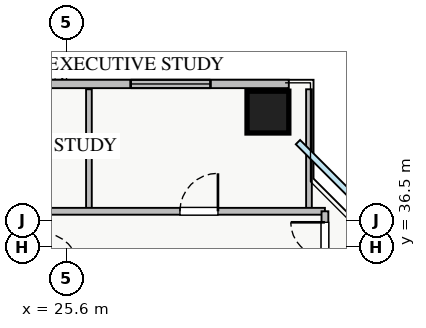
"""IFC4 building model, lengths in metres.
Left out: names, types, materials, properties, quantities, classifications, styles, units other than length and angle.
Written with IfcOpenShell. Run it as: python <this file> out.ifc"""

import sys

from ifc_helpers import new_model, si_unit, direction, frame, frame_2d, origin, origin_2d, place, context, subcontext, project, spatial, rectangle, extrude, source, transform, mapped, element, fill, save


model = new_model("IFC4")
c1 = context("Model", 3, precision=1e-05, world=origin(), true_north=direction((0.0, 1.0)))
c2 = subcontext(c1, "Body", "Model", "MODEL_VIEW")
j1 = project(units=[si_unit("LENGTHUNIT", "METRE"), si_unit("PLANEANGLEUNIT", "RADIAN")], contexts=[c1])
p1 = place(None, origin())
s1 = spatial("IfcSite", under=j1, at=p1, CompositionType="ELEMENT")
p2 = place(p1, origin())
s2 = spatial("IfcBuilding", under=s1, at=p2, CompositionType="ELEMENT")
p3 = place(p2, frame((0.0, 0.0, 100.25)))
s3 = spatial("IfcBuildingStorey", under=s2, at=p3, CompositionType="ELEMENT", Elevation=100.25)
m1 = source(origin(), c2, "Body", "SweptSolid", [
    extrude(rectangle(XDim=1.1, YDim=1.1, at=origin_2d()), origin(), (0.0, 0.0, 1.0), 3.25),
])
p4 = place(p3, frame((30.9, 40.05, 0.0), z_axis=(0.0, 0.0, 1.0), x_axis=(1.0, 0.0, 0.0)))
e1 = element("IfcColumn", 1, at=p4, inside=s3, PredefinedType="COLUMN", context=c2, shape_type="MappedRepresentation", body=[
    mapped(m1, transform((0.0, 0.0, 0.0), x_axis=(1.0, 0.0, 0.0), y_axis=(0.0, 1.0, 0.0), z_axis=(0.0, 0.0, 1.0), scale=1.0)),
])
p5 = place(p3, frame((6.55, 40.79, 0.0), z_axis=(0.0, 0.0, 1.0), x_axis=(1.0, 0.0, 0.0)))
e2 = element("IfcWall", 2, at=p5, inside=s3, PredefinedType="STANDARD", context=c2, shape_type="SweptSolid", body=[
    extrude(rectangle(XDim=24.9, YDim=0.22, at=frame_2d((12.45, 0.0))), origin(), (0.0, 0.0, 1.0), 2.61),
])
p6 = place(p5, frame((13.3, 0.0, 0.0)))
e3 = element("IfcOpeningElement", 3, at=p6, cuts=e2, PredefinedType="OPENING", context=c2, shape_type="SweptSolid", body=[
    extrude(rectangle(XDim=1.2, YDim=2.1, at=frame_2d((0.6, 1.05))), frame((0.0, 0.12, 0.0), z_axis=(0.0, -1.0, 0.0), x_axis=(1.0, 0.0, 0.0)), (0.0, 0.0, 1.0), 0.24),
])
p7 = place(p5, frame((0.393, 0.0, 0.9)))
e4 = element("IfcOpeningElement", 4, at=p7, cuts=e2, PredefinedType="OPENING", context=c2, shape_type="SweptSolid", body=[
    extrude(rectangle(XDim=1.5, YDim=1.5, at=frame_2d((0.75, 0.75))), frame((0.0, 0.12, 0.0), z_axis=(0.0, -1.0, 0.0), x_axis=(1.0, 0.0, 0.0)), (0.0, 0.0, 1.0), 0.24),
])
p8 = place(p5, frame((9.76, 0.0, 0.9)))
e5 = element("IfcOpeningElement", 5, at=p8, cuts=e2, PredefinedType="OPENING", context=c2, shape_type="SweptSolid", body=[
    extrude(rectangle(XDim=1.8, YDim=1.5, at=frame_2d((0.9, 0.75))), frame((0.0, 0.12, 0.0), z_axis=(0.0, -1.0, 0.0), x_axis=(1.0, 0.0, 0.0)), (0.0, 0.0, 1.0), 0.24),
])
p9 = place(p5, frame((14.813, 0.0, 0.9)))
e6 = element("IfcOpeningElement", 6, at=p9, cuts=e2, PredefinedType="OPENING", context=c2, shape_type="SweptSolid", body=[
    extrude(rectangle(XDim=1.5, YDim=1.45, at=frame_2d((0.75, 0.725))), frame((0.0, 0.12, 0.0), z_axis=(0.0, -1.0, 0.0), x_axis=(1.0, 0.0, 0.0)), (0.0, 0.0, 1.0), 0.24),
])
p10 = place(p5, frame((20.738, 0.0, 0.9)))
e7 = element("IfcOpeningElement", 7, at=p10, cuts=e2, PredefinedType="OPENING", context=c2, shape_type="SweptSolid", body=[
    extrude(rectangle(XDim=2.1, YDim=1.48, at=frame_2d((1.05, 0.74))), frame((0.0, 0.12, 0.0), z_axis=(0.0, -1.0, 0.0), x_axis=(1.0, 0.0, 0.0)), (0.0, 0.0, 1.0), 0.24),
])
p11 = place(p5, frame((4.171, 0.0, 0.9)))
e8 = element("IfcOpeningElement", 8, at=p11, cuts=e2, PredefinedType="OPENING", context=c2, shape_type="SweptSolid", body=[
    extrude(rectangle(XDim=2.4, YDim=1.5, at=frame_2d((1.2, 0.75))), frame((0.0, 0.12, 0.0), z_axis=(0.0, -1.0, 0.0), x_axis=(1.0, 0.0, 0.0)), (0.0, 0.0, 1.0), 0.24),
])
for number, where, z_axis, x_axis in (
    (9, (26.19, 37.44, 0.0), (0.0, 0.0, 1.0), (0.0, 1.0, 0.0)),
    (10, (31.98, 37.44, 0.0), (0.0, 0.0, 1.0), (0.0, 1.0, 0.0)),
):
    element("IfcWall", number, at=place(p3, frame(where, z_axis=z_axis, x_axis=x_axis)), inside=s3, PredefinedType="PARTITIONING", context=c2, shape_type="SweptSolid", body=[
        extrude(rectangle(XDim=3.21, YDim=0.15, at=frame_2d((1.605, 0.0))), origin(), (0.0, 0.0, 1.0), 3.07),
    ])
p12 = place(p3, frame((8.82, 37.44, 0.0), z_axis=(0.0, 0.0, 1.0), x_axis=(1.0, 0.0, 0.0)))
e11 = element("IfcWall", 11, at=p12, inside=s3, PredefinedType="PARTITIONING", context=c2, shape_type="SweptSolid", body=[
    extrude(rectangle(XDim=23.58, YDim=0.18, at=frame_2d((11.79, 0.0))), origin(), (0.0, 0.0, 1.0), 3.07),
])
p13 = place(p12, frame((2.75, 0.0, 0.0)))
e12 = element("IfcOpeningElement", 12, at=p13, cuts=e11, PredefinedType="OPENING", context=c2, shape_type="SweptSolid", body=[
    extrude(rectangle(XDim=1.0, YDim=2.05, at=frame_2d((0.5, 1.025))), frame((0.0, 0.1, 0.0), z_axis=(0.0, -1.0, 0.0), x_axis=(1.0, 0.0, 0.0)), (0.0, 0.0, 1.0), 0.2),
])
p14 = place(p12, frame((7.89, 0.0, 0.0)))
e13 = element("IfcOpeningElement", 13, at=p14, cuts=e11, PredefinedType="OPENING", context=c2, shape_type="SweptSolid", body=[
    extrude(rectangle(XDim=1.0, YDim=2.05, at=frame_2d((0.5, 1.025))), frame((0.0, 0.1, 0.0), z_axis=(0.0, -1.0, 0.0), x_axis=(1.0, 0.0, 0.0)), (0.0, 0.0, 1.0), 0.2),
])
p15 = place(p12, frame((13.325, 0.0, 0.0)))
e14 = element("IfcOpeningElement", 14, at=p15, cuts=e11, PredefinedType="OPENING", context=c2, shape_type="SweptSolid", body=[
    extrude(rectangle(XDim=1.0, YDim=2.05, at=frame_2d((0.5, 1.025))), frame((0.0, 0.1, 0.0), z_axis=(0.0, -1.0, 0.0), x_axis=(1.0, 0.0, 0.0)), (0.0, 0.0, 1.0), 0.2),
])
p16 = place(p12, frame((19.765, 0.0, 0.0)))
e15 = element("IfcOpeningElement", 15, at=p16, cuts=e11, PredefinedType="OPENING", context=c2, shape_type="SweptSolid", body=[
    extrude(rectangle(XDim=1.0, YDim=2.05, at=frame_2d((0.5, 1.025))), frame((0.0, 0.1, 0.0), z_axis=(0.0, -1.0, 0.0), x_axis=(1.0, 0.0, 0.0)), (0.0, 0.0, 1.0), 0.2),
])
p17 = place(p3, frame((32.4, 8.31, 0.0), z_axis=(0.0, 0.0, 1.0), x_axis=(0.0, 1.0, 0.0)))
e16 = element("IfcWall", 16, at=p17, inside=s3, PredefinedType="PARTITIONING", context=c2, shape_type="SweptSolid", body=[
    extrude(rectangle(XDim=29.13, YDim=0.18, at=frame_2d((14.565, 0.0))), origin(), (0.0, 0.0, 1.0), 3.07),
])
p18 = place(p17, frame((27.94, 0.0, 0.0)))
e17 = element("IfcOpeningElement", 17, at=p18, cuts=e16, PredefinedType="OPENING", context=c2, shape_type="SweptSolid", body=[
    extrude(rectangle(XDim=0.9, YDim=2.05, at=frame_2d((0.45, 1.025))), frame((0.0, 0.1, 0.0), z_axis=(0.0, -1.0, 0.0), x_axis=(1.0, 0.0, 0.0)), (0.0, 0.0, 1.0), 0.2),
])
p19 = place(p17, frame((0.415, 0.0, 0.0)))
e18 = element("IfcOpeningElement", 18, at=p19, cuts=e16, PredefinedType="OPENING", context=c2, shape_type="SweptSolid", body=[
    extrude(rectangle(XDim=0.9, YDim=2.05, at=frame_2d((0.45, 1.025))), frame((0.0, 0.1, 0.0), z_axis=(0.0, -1.0, 0.0), x_axis=(1.0, 0.0, 0.0)), (0.0, 0.0, 1.0), 0.2),
])
p20 = place(p17, frame((5.88, 0.0, 0.0)))
e19 = element("IfcOpeningElement", 19, at=p20, cuts=e16, PredefinedType="OPENING", context=c2, shape_type="SweptSolid", body=[
    extrude(rectangle(XDim=1.0, YDim=2.05, at=frame_2d((0.5, 1.025))), frame((0.0, 0.1, 0.0), z_axis=(0.0, -1.0, 0.0), x_axis=(1.0, 0.0, 0.0)), (0.0, 0.0, 1.0), 0.2),
])
p21 = place(p17, frame((12.23, 0.0, 0.0)))
e20 = element("IfcOpeningElement", 20, at=p21, cuts=e16, PredefinedType="OPENING", context=c2, shape_type="SweptSolid", body=[
    extrude(rectangle(XDim=1.0, YDim=2.05, at=frame_2d((0.5, 1.025))), frame((0.0, 0.1, 0.0), z_axis=(0.0, -1.0, 0.0), x_axis=(1.0, 0.0, 0.0)), (0.0, 0.0, 1.0), 0.2),
])
p22 = place(p17, frame((20.835, 0.0, 0.0)))
e21 = element("IfcOpeningElement", 21, at=p22, cuts=e16, PredefinedType="OPENING", context=c2, shape_type="SweptSolid", body=[
    extrude(rectangle(XDim=1.0, YDim=2.05, at=frame_2d((0.5, 1.025))), frame((0.0, 0.1, 0.0), z_axis=(0.0, -1.0, 0.0), x_axis=(1.0, 0.0, 0.0)), (0.0, 0.0, 1.0), 0.2),
])
m2 = source(origin(), c2, "Body", "SweptSolid", [
    extrude(rectangle(XDim=2.1, YDim=1.48, at=frame_2d((1.05, 0.74))), frame((0.0, 0.03, 0.0), z_axis=(0.0, -1.0, 0.0), x_axis=(1.0, 0.0, 0.0)), (0.0, 0.0, 1.0), 0.06),
])
p23 = place(p10, origin())
e22 = element("IfcWindow", 22, at=p23, inside=s3, PartitioningType="TRIPLE_PANEL_VERTICAL", PredefinedType="WINDOW", context=c2, shape_type="MappedRepresentation", body=[
    mapped(m2, transform((0.0, 0.0, 0.0), x_axis=(1.0, 0.0, 0.0), y_axis=(0.0, 1.0, 0.0), z_axis=(0.0, 0.0, 1.0), scale=1.0)),
])
fill(e7, e22)
m3 = source(origin(), c2, "Body", "SweptSolid", [
    extrude(rectangle(XDim=1.0, YDim=2.05, at=frame_2d((0.5, 1.025))), frame((0.0, 0.025, 0.0), z_axis=(0.0, -1.0, 0.0), x_axis=(1.0, 0.0, 0.0)), (0.0, 0.0, 1.0), 0.05),
])
p24 = place(p16, origin())
e23 = element("IfcDoor", 23, at=p24, inside=s3, OperationType="SINGLE_SWING_RIGHT", PredefinedType="DOOR", context=c2, shape_type="MappedRepresentation", body=[
    mapped(m3, transform((0.0, 0.0, 0.0), x_axis=(1.0, 0.0, 0.0), y_axis=(0.0, 1.0, 0.0), z_axis=(0.0, 0.0, 1.0), scale=1.0)),
])
fill(e15, e23)
m4 = source(origin(), c2, "Body", "SweptSolid", [
    extrude(rectangle(XDim=0.9, YDim=2.05, at=frame_2d((0.45, 1.025))), frame((0.0, 0.025, 0.0), z_axis=(0.0, -1.0, 0.0), x_axis=(1.0, 0.0, 0.0)), (0.0, 0.0, 1.0), 0.05),
])
p25 = place(p18, origin())
e24 = element("IfcDoor", 24, at=p25, inside=s3, OperationType="SINGLE_SWING_RIGHT", PredefinedType="DOOR", context=c2, shape_type="MappedRepresentation", body=[
    mapped(m4, transform((0.0, 0.0, 0.0), x_axis=(1.0, 0.0, 0.0), y_axis=(0.0, 1.0, 0.0), z_axis=(0.0, 0.0, 1.0), scale=1.0)),
])
fill(e17, e24)
save(model, sys.argv[1])
